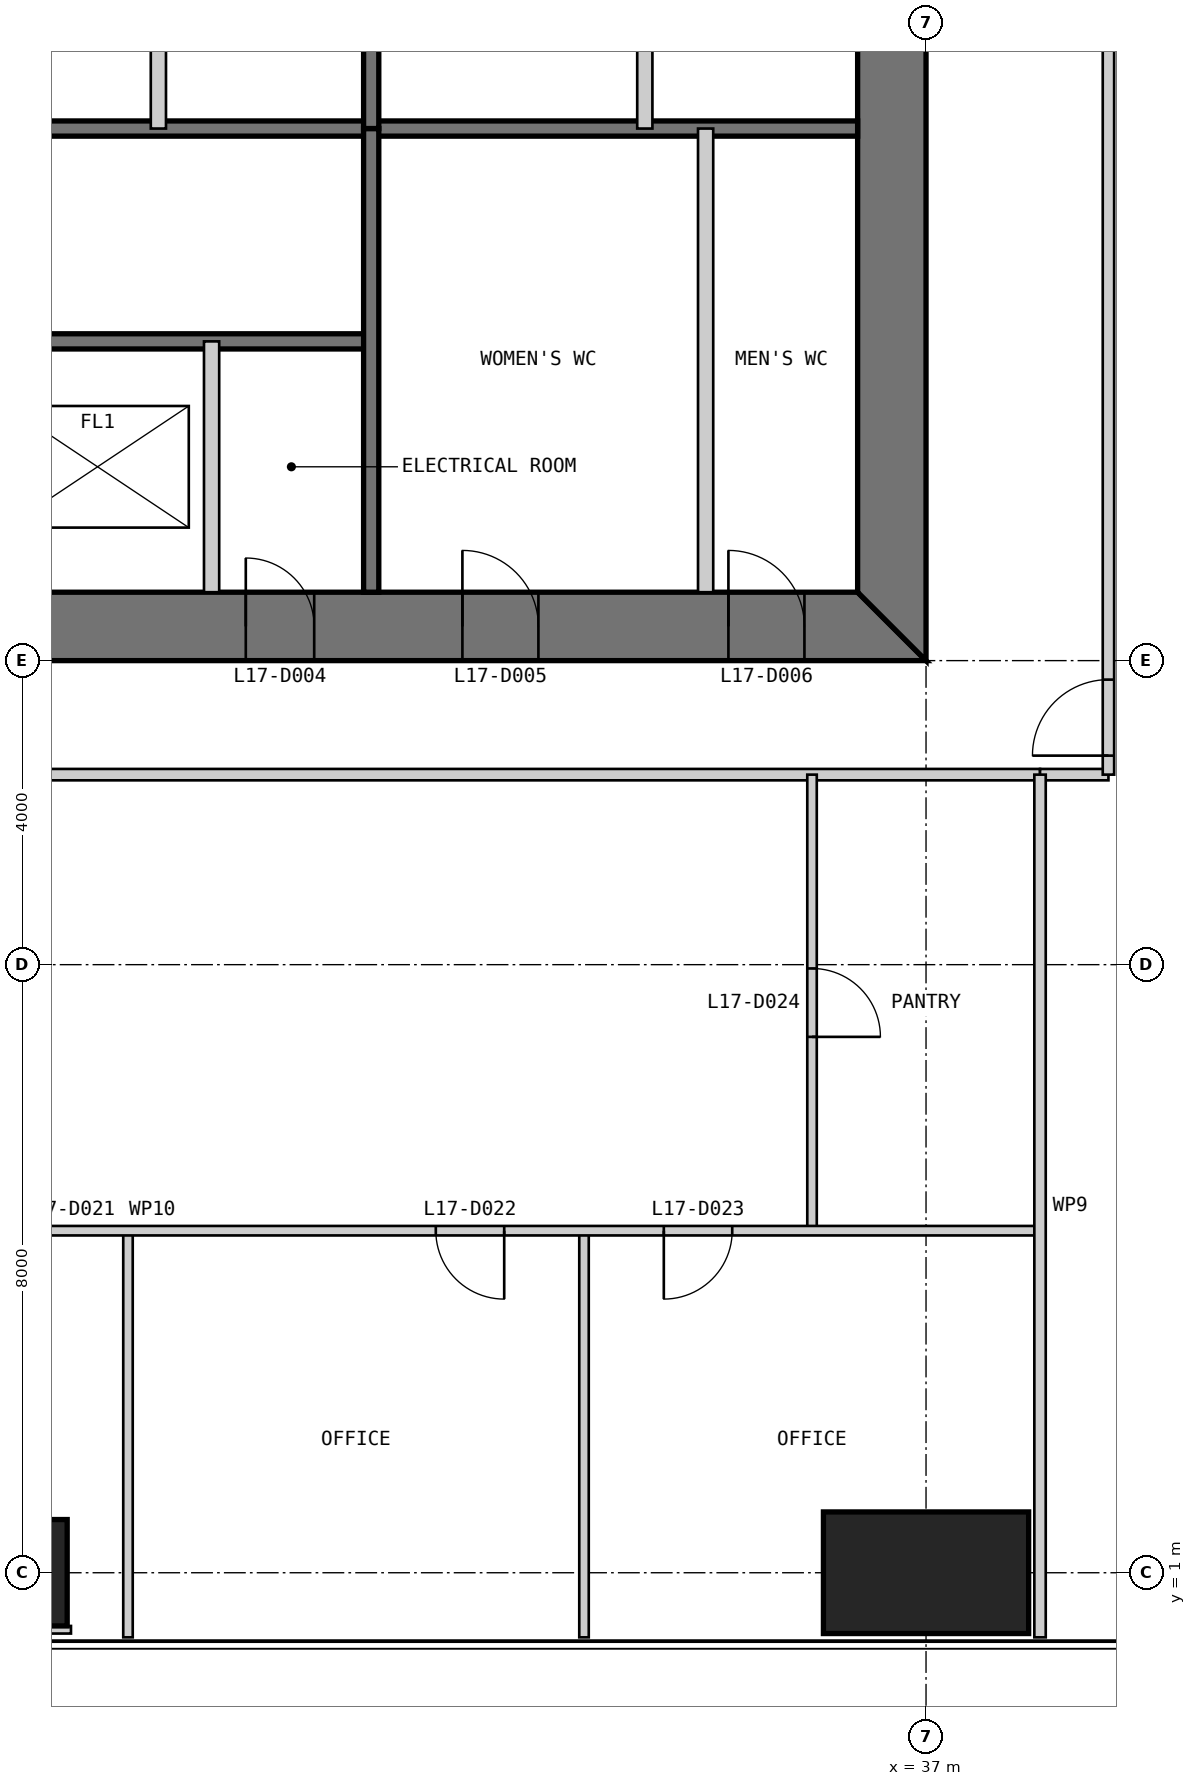
"""IFC4 building model, lengths in metres.
Left out: names, types, materials, properties, quantities, classifications, styles, units other than length and angle.
Written with IfcOpenShell. Run it as: python <this file> out.ifc"""

import sys

from ifc_helpers import new_model, si_unit, direction, frame, frame_2d, origin, origin_2d, place, context, subcontext, project, spatial, polyline, rectangle, outline, extrude, element, fill, save


model = new_model("IFC4")
c1 = context("Model", 3, precision=1e-05, world=origin(), true_north=direction((0.0, 1.0)))
c2 = subcontext(c1, "Body", "Model", "MODEL_VIEW")
j1 = project(units=[si_unit("LENGTHUNIT", "METRE"), si_unit("PLANEANGLEUNIT", "RADIAN")], contexts=[c1])
p1 = place(None, origin())
s1 = spatial("IfcSite", under=j1, at=p1, CompositionType="ELEMENT")
p2 = place(p1, origin())
s2 = spatial("IfcBuilding", under=s1, at=p2, CompositionType="ELEMENT")
p3 = place(p2, frame((0.0, 0.0, 75.0)))
s3 = spatial("IfcBuildingStorey", under=s2, at=p3, CompositionType="ELEMENT", Elevation=75.0)
p4 = place(p3, frame((25.0, 1.0, 0.0), z_axis=(0.0, 0.0, 1.0), x_axis=(1.0, 0.0, 0.0)))
e1 = element("IfcColumn", 1, at=p4, inside=s3, PredefinedType="COLUMN", context=c2, shape_type="SweptSolid", body=[
    extrude(rectangle(XDim=1.4, YDim=1.4, at=origin_2d()), origin(), (0.0, 0.0, 1.0), 4.0),
])
p5 = place(p3, frame((37.0, 1.0, 0.0), z_axis=(0.0, 0.0, 1.0), x_axis=(1.0, 0.0, 0.0)))
e2 = element("IfcColumn", 2, at=p5, inside=s3, PredefinedType="COLUMN", context=c2, shape_type="SweptSolid", body=[
    extrude(rectangle(XDim=2.7, YDim=1.6, at=origin_2d()), origin(), (0.0, 0.0, 1.0), 4.0),
])
p6 = place(p3, frame((13.0, 13.45, 0.0), z_axis=(0.0, 0.0, 1.0), x_axis=(1.0, 0.0, 0.0)))
e3 = element("IfcWall", 3, at=p6, inside=s3, PredefinedType="SHEAR", context=c2, shape_type="SweptSolid", body=[
    extrude(outline(polyline([(0.0, -0.45), (24.0, -0.45), (23.1, 0.45), (0.9, 0.45), (0.0, -0.45)])), origin(), (0.0, 0.0, 1.0), 4.0),
])
p7 = place(p6, frame((4.9, 0.0, 0.0)))
e4 = element("IfcOpeningElement", 4, at=p7, cuts=e3, PredefinedType="OPENING", context=c2, shape_type="SweptSolid", body=[
    extrude(rectangle(XDim=1.0, YDim=2.2, at=frame_2d((0.5, 1.1))), frame((0.0, 0.46, 0.0), z_axis=(0.0, -1.0, 0.0), x_axis=(1.0, 0.0, 0.0)), (0.0, 0.0, 1.0), 0.92),
])
p8 = place(p6, frame((8.9, 0.0, 0.0)))
e5 = element("IfcOpeningElement", 5, at=p8, cuts=e3, PredefinedType="OPENING", context=c2, shape_type="SweptSolid", body=[
    extrude(rectangle(XDim=1.1, YDim=2.2, at=frame_2d((0.55, 1.1))), frame((0.0, 0.46, 0.0), z_axis=(0.0, -1.0, 0.0), x_axis=(1.0, 0.0, 0.0)), (0.0, 0.0, 1.0), 0.92),
])
p9 = place(p6, frame((15.05, 0.0, 0.0)))
e6 = element("IfcOpeningElement", 6, at=p9, cuts=e3, PredefinedType="OPENING", context=c2, shape_type="SweptSolid", body=[
    extrude(rectangle(XDim=0.9, YDim=2.2, at=frame_2d((0.45, 1.1))), frame((0.0, 0.46, 0.0), z_axis=(0.0, -1.0, 0.0), x_axis=(1.0, 0.0, 0.0)), (0.0, 0.0, 1.0), 0.92),
])
p10 = place(p6, frame((17.9, 0.0, 0.0)))
e7 = element("IfcOpeningElement", 7, at=p10, cuts=e3, PredefinedType="OPENING", context=c2, shape_type="SweptSolid", body=[
    extrude(rectangle(XDim=1.0, YDim=2.2, at=frame_2d((0.5, 1.1))), frame((0.0, 0.46, 0.0), z_axis=(0.0, -1.0, 0.0), x_axis=(1.0, 0.0, 0.0)), (0.0, 0.0, 1.0), 0.92),
])
p11 = place(p6, frame((21.4, 0.0, 0.0)))
e8 = element("IfcOpeningElement", 8, at=p11, cuts=e3, PredefinedType="OPENING", context=c2, shape_type="SweptSolid", body=[
    extrude(rectangle(XDim=1.0, YDim=2.2, at=frame_2d((0.5, 1.1))), frame((0.0, 0.46, 0.0), z_axis=(0.0, -1.0, 0.0), x_axis=(1.0, 0.0, 0.0)), (0.0, 0.0, 1.0), 0.92),
])
p12 = place(p3, frame((36.55, 13.9, 0.0), z_axis=(0.0, 0.0, 1.0), x_axis=(0.0, 1.0, 0.0)))
e9 = element("IfcWall", 9, at=p12, inside=s3, PredefinedType="SHEAR", context=c2, shape_type="SweptSolid", body=[
    extrude(outline(polyline([(-0.9, -0.45), (23.1, -0.45), (22.2, 0.45), (0.0, 0.45), (-0.9, -0.45)])), origin(), (0.0, 0.0, 1.0), 4.0),
])
p13 = place(p12, frame((20.2, 0.0, 0.0)))
e10 = element("IfcOpeningElement", 10, at=p13, cuts=e9, PredefinedType="OPENING", context=c2, shape_type="SweptSolid", body=[
    extrude(rectangle(XDim=1.0, YDim=2.2, at=frame_2d((0.5, 1.1))), frame((0.0, 0.46, 0.0), z_axis=(0.0, -1.0, 0.0), x_axis=(1.0, 0.0, 0.0)), (0.0, 0.0, 1.0), 0.92),
])
p14 = place(p12, frame((17.25, 0.0, 0.0)))
e11 = element("IfcOpeningElement", 11, at=p14, cuts=e9, PredefinedType="OPENING", context=c2, shape_type="SweptSolid", body=[
    extrude(rectangle(XDim=0.9, YDim=2.2, at=frame_2d((0.45, 1.1))), frame((0.0, 0.46, 0.0), z_axis=(0.0, -1.0, 0.0), x_axis=(1.0, 0.0, 0.0)), (0.0, 0.0, 1.0), 0.92),
])
p15 = place(p3, frame((20.3, 17.2, 0.0), z_axis=(0.0, 0.0, 1.0), x_axis=(1.0, 0.0, 0.0)))
e12 = element("IfcWall", 12, at=p15, inside=s3, PredefinedType="SOLIDWALL", context=c2, shape_type="SweptSolid", body=[
    extrude(rectangle(XDim=9.4, YDim=0.2, at=frame_2d((4.7, 0.0))), origin(), (0.0, 0.0, 1.0), 3.8),
])
p16 = place(p15, frame((0.25, 0.0, 0.0)))
e13 = element("IfcOpeningElement", 13, at=p16, cuts=e12, PredefinedType="OPENING", context=c2, shape_type="SweptSolid", body=[
    extrude(rectangle(XDim=1.0, YDim=2.2, at=frame_2d((0.5, 1.1))), frame((0.0, 0.11, 0.0), z_axis=(0.0, -1.0, 0.0), x_axis=(1.0, 0.0, 0.0)), (0.0, 0.0, 1.0), 0.22),
])
p17 = place(p3, frame((20.3, 20.0, 0.0), z_axis=(0.0, 0.0, 1.0), x_axis=(1.0, 0.0, 0.0)))
e14 = element("IfcWall", 14, at=p17, inside=s3, PredefinedType="SOLIDWALL", context=c2, shape_type="SweptSolid", body=[
    extrude(rectangle(XDim=15.8, YDim=0.2, at=frame_2d((7.9, 0.0))), origin(), (0.0, 0.0, 1.0), 3.8),
])
p18 = place(p3, frame((27.6, 13.9, 0.0), z_axis=(0.0, 0.0, 1.0), x_axis=(0.0, 1.0, 0.0)))
e15 = element("IfcWall", 15, at=p18, inside=s3, PredefinedType="PARTITIONING", context=c2, shape_type="SweptSolid", body=[
    extrude(rectangle(XDim=3.3, YDim=0.2, at=frame_2d((1.65, 0.0))), origin(), (0.0, 0.0, 1.0), 3.8),
])
p19 = place(p3, frame((29.7, 13.9, 0.0), z_axis=(0.0, 0.0, 1.0), x_axis=(0.0, 1.0, 0.0)))
e16 = element("IfcWall", 16, at=p19, inside=s3, PredefinedType="SOLIDWALL", context=c2, shape_type="SweptSolid", body=[
    extrude(rectangle(XDim=6.1, YDim=0.2, at=frame_2d((3.05, 0.0))), origin(), (0.0, 0.0, 1.0), 3.8),
])
p20 = place(p3, frame((34.1, 13.9, 0.0), z_axis=(0.0, 0.0, 1.0), x_axis=(0.0, 1.0, 0.0)))
e17 = element("IfcWall", 17, at=p20, inside=s3, PredefinedType="PARTITIONING", context=c2, shape_type="SweptSolid", body=[
    extrude(rectangle(XDim=6.1, YDim=0.2, at=frame_2d((3.05, 0.0))), origin(), (0.0, 0.0, 1.0), 3.8),
])
p21 = place(p3, frame((33.3, 36.1, 0.0), z_axis=(0.0, 0.0, 1.0), x_axis=(0.0, -1.0, 0.0)))
e18 = element("IfcWall", 18, at=p21, inside=s3, PredefinedType="PARTITIONING", context=c2, shape_type="SweptSolid", body=[
    extrude(rectangle(XDim=16.1, YDim=0.2, at=frame_2d((8.05, 0.0))), origin(), (0.0, 0.0, 1.0), 3.8),
])
p22 = place(p21, frame((4.4, 0.0, 0.0)))
e19 = element("IfcOpeningElement", 19, at=p22, cuts=e18, PredefinedType="OPENING", context=c2, shape_type="SweptSolid", body=[
    extrude(rectangle(XDim=0.9, YDim=2.2, at=frame_2d((0.45, 1.1))), frame((0.0, 0.11, 0.0), z_axis=(0.0, -1.0, 0.0), x_axis=(1.0, 0.0, 0.0)), (0.0, 0.0, 1.0), 0.22),
])
p23 = place(p3, frame((29.7, 36.1, 0.0), z_axis=(0.0, 0.0, 1.0), x_axis=(0.0, -1.0, 0.0)))
e20 = element("IfcWall", 20, at=p23, inside=s3, PredefinedType="SOLIDWALL", context=c2, shape_type="SweptSolid", body=[
    extrude(rectangle(XDim=16.1, YDim=0.2, at=frame_2d((8.05, 0.0))), origin(), (0.0, 0.0, 1.0), 3.8),
])
p24 = place(p3, frame((26.9, 30.0, 0.0), z_axis=(0.0, 0.0, 1.0), x_axis=(0.0, -1.0, 0.0)))
e21 = element("IfcWall", 21, at=p24, inside=s3, PredefinedType="PARTITIONING", context=c2, shape_type="SweptSolid", body=[
    extrude(rectangle(XDim=10.0, YDim=0.2, at=frame_2d((5.0, 0.0))), origin(), (0.0, 0.0, 1.0), 3.8),
])
p25 = place(p3, frame((11.5, 11.5, 0.0), z_axis=(0.0, 0.0, 1.0), x_axis=(1.0, 0.0, 0.0)))
e22 = element("IfcWall", 22, at=p25, inside=s3, PredefinedType="PARTITIONING", context=c2, shape_type="SweptSolid", body=[
    extrude(rectangle(XDim=27.0, YDim=0.15, at=frame_2d((13.5, 0.0))), origin(), (0.0, 0.0, 1.0), 3.85),
])
p26 = place(p25, frame((11.5, 0.0, 0.0)))
e23 = element("IfcOpeningElement", 23, at=p26, cuts=e22, PredefinedType="OPENING", context=c2, shape_type="SweptSolid", body=[
    extrude(rectangle(XDim=1.0, YDim=2.2, at=frame_2d((0.5, 1.1))), frame((0.0, 0.085, 0.0), z_axis=(0.0, -1.0, 0.0), x_axis=(1.0, 0.0, 0.0)), (0.0, 0.0, 1.0), 0.17),
])
for number, where, z_axis, x_axis in (
    (24, (26.5, 0.15, 0.0), (0.0, 0.0, 1.0), (0.0, 1.0, 0.0)),
    (25, (32.5, 0.15, 0.0), (0.0, 0.0, 1.0), (0.0, 1.0, 0.0)),
):
    element("IfcWall", number, at=place(p3, frame(where, z_axis=z_axis, x_axis=x_axis)), inside=s3, PredefinedType="PARTITIONING", context=c2, shape_type="SweptSolid", body=[
        extrude(rectangle(XDim=5.35, YDim=0.125, at=frame_2d((2.675, 0.0))), origin(), (0.0, 0.0, 1.0), 3.85),
    ])
p27 = place(p3, frame((35.5, 5.5, 0.0), z_axis=(0.0, 0.0, 1.0), x_axis=(0.0, 1.0, 0.0)))
e26 = element("IfcWall", 26, at=p27, inside=s3, PredefinedType="PARTITIONING", context=c2, shape_type="SweptSolid", body=[
    extrude(rectangle(XDim=6.0, YDim=0.125, at=frame_2d((3.0, 0.0))), origin(), (0.0, 0.0, 1.0), 3.85),
])
p28 = place(p27, frame((2.55, 0.0, 0.0)))
e27 = element("IfcOpeningElement", 27, at=p28, cuts=e26, PredefinedType="OPENING", context=c2, shape_type="SweptSolid", body=[
    extrude(rectangle(XDim=0.9, YDim=2.2, at=frame_2d((0.45, 1.1))), frame((0.0, 0.073, 0.0), z_axis=(0.0, -1.0, 0.0), x_axis=(1.0, 0.0, 0.0)), (0.0, 0.0, 1.0), 0.145),
])
p29 = place(p3, frame((14.5, 5.5, 0.0), z_axis=(0.0, 0.0, 1.0), x_axis=(1.0, 0.0, 0.0)))
e28 = element("IfcWall", 28, at=p29, inside=s3, PredefinedType="PARTITIONING", context=c2, shape_type="SweptSolid", body=[
    extrude(rectangle(XDim=24.0, YDim=0.125, at=frame_2d((12.0, 0.0))), origin(), (0.0, 0.0, 1.0), 3.85),
])
p30 = place(p29, frame((10.05, 0.0, 0.0)))
e29 = element("IfcOpeningElement", 29, at=p30, cuts=e28, PredefinedType="OPENING", context=c2, shape_type="SweptSolid", body=[
    extrude(rectangle(XDim=0.9, YDim=2.2, at=frame_2d((0.45, 1.1))), frame((0.0, 0.073, 0.0), z_axis=(0.0, -1.0, 0.0), x_axis=(1.0, 0.0, 0.0)), (0.0, 0.0, 1.0), 0.145),
])
p31 = place(p29, frame((16.05, 0.0, 0.0)))
e30 = element("IfcOpeningElement", 30, at=p31, cuts=e28, PredefinedType="OPENING", context=c2, shape_type="SweptSolid", body=[
    extrude(rectangle(XDim=0.9, YDim=2.2, at=frame_2d((0.45, 1.1))), frame((0.0, 0.073, 0.0), z_axis=(0.0, -1.0, 0.0), x_axis=(1.0, 0.0, 0.0)), (0.0, 0.0, 1.0), 0.145),
])
p32 = place(p29, frame((19.05, 0.0, 0.0)))
e31 = element("IfcOpeningElement", 31, at=p32, cuts=e28, PredefinedType="OPENING", context=c2, shape_type="SweptSolid", body=[
    extrude(rectangle(XDim=0.9, YDim=2.2, at=frame_2d((0.45, 1.1))), frame((0.0, 0.073, 0.0), z_axis=(0.0, -1.0, 0.0), x_axis=(1.0, 0.0, 0.0)), (0.0, 0.0, 1.0), 0.145),
])
p33 = place(p3, frame((38.5, 11.5, 0.0), z_axis=(0.0, 0.0, 1.0), x_axis=(1.0, 0.0, 0.0)))
e32 = element("IfcWall", 32, at=p33, inside=s3, PredefinedType="PARTITIONING", context=c2, shape_type="SweptSolid", body=[
    extrude(rectangle(XDim=0.9, YDim=0.15, at=frame_2d((0.45, 0.0))), origin(), (0.0, 0.0, 1.0), 3.85),
])
p34 = place(p3, frame((39.4, 11.5, 0.0), z_axis=(0.0, 0.0, 1.0), x_axis=(0.0, 1.0, 0.0)))
e33 = element("IfcWall", 33, at=p34, inside=s3, PredefinedType="PARTITIONING", context=c2, shape_type="SweptSolid", body=[
    extrude(rectangle(XDim=27.9, YDim=0.15, at=frame_2d((13.95, 0.0))), origin(), (0.0, 0.0, 1.0), 3.85),
])
p35 = place(p34, frame((0.25, 0.0, 0.0)))
e34 = element("IfcOpeningElement", 34, at=p35, cuts=e33, PredefinedType="OPENING", context=c2, shape_type="SweptSolid", body=[
    extrude(rectangle(XDim=1.0, YDim=2.2, at=frame_2d((0.5, 1.1))), frame((0.0, 0.085, 0.0), z_axis=(0.0, -1.0, 0.0), x_axis=(1.0, 0.0, 0.0)), (0.0, 0.0, 1.0), 0.17),
])
p36 = place(p34, frame((22.75, 0.0, 0.0)))
e35 = element("IfcOpeningElement", 35, at=p36, cuts=e33, PredefinedType="OPENING", context=c2, shape_type="SweptSolid", body=[
    extrude(rectangle(XDim=1.0, YDim=2.2, at=frame_2d((0.5, 1.1))), frame((0.0, 0.085, 0.0), z_axis=(0.0, -1.0, 0.0), x_axis=(1.0, 0.0, 0.0)), (0.0, 0.0, 1.0), 0.17),
])
p37 = place(p3, frame((38.5, 0.15, 0.0), z_axis=(0.0, 0.0, 1.0), x_axis=(0.0, 1.0, 0.0)))
e36 = element("IfcWall", 36, at=p37, inside=s3, PredefinedType="PARTITIONING", context=c2, shape_type="SweptSolid", body=[
    extrude(rectangle(XDim=11.35, YDim=0.15, at=frame_2d((5.675, 0.0))), origin(), (0.0, 0.0, 1.0), 3.85),
])
p38 = place(p3, frame((25.0, 0.2, 0.0), z_axis=(0.0, 0.0, 1.0), x_axis=(0.0, 1.0, 0.0)))
e37 = element("IfcWall", 37, at=p38, inside=s3, PredefinedType="PARTITIONING", context=c2, shape_type="SweptSolid", body=[
    extrude(rectangle(XDim=0.1, YDim=1.5, at=frame_2d((0.05, 0.0))), origin(), (0.0, 0.0, 1.0), 3.85),
])
p39 = place(p9, origin())
e38 = element("IfcDoor", 38, at=p39, inside=s3, OperationType="SINGLE_SWING_LEFT", PredefinedType="DOOR", context=c2, shape_type="SweptSolid", body=[
    extrude(rectangle(XDim=0.9, YDim=2.2, at=frame_2d((0.45, 1.1))), frame((0.0, 0.025, 0.0), z_axis=(0.0, -1.0, 0.0), x_axis=(1.0, 0.0, 0.0)), (0.0, 0.0, 1.0), 0.05),
    extrude(outline(polyline([(0.0, 0.0), (0.04, 0.0), (0.04, 2.16), (0.86, 2.16), (0.86, 0.0), (0.9, 0.0), (0.9, 2.2), (0.0, 2.2), (0.0, 0.0)])), frame((0.0, 0.3, 0.0), z_axis=(0.0, -1.0, 0.0), x_axis=(1.0, 0.0, 0.0)), (0.0, 0.0, 1.0), 0.6),
])
fill(e6, e38)
p40 = place(p10, origin())
e39 = element("IfcDoor", 39, at=p40, inside=s3, OperationType="SINGLE_SWING_LEFT", PredefinedType="DOOR", context=c2, shape_type="SweptSolid", body=[
    extrude(rectangle(XDim=1.0, YDim=2.2, at=frame_2d((0.5, 1.1))), frame((0.0, 0.025, 0.0), z_axis=(0.0, -1.0, 0.0), x_axis=(1.0, 0.0, 0.0)), (0.0, 0.0, 1.0), 0.05),
    extrude(outline(polyline([(0.0, 0.0), (0.04, 0.0), (0.04, 2.16), (0.96, 2.16), (0.96, 0.0), (1.0, 0.0), (1.0, 2.2), (0.0, 2.2), (0.0, 0.0)])), frame((0.0, 0.3, 0.0), z_axis=(0.0, -1.0, 0.0), x_axis=(1.0, 0.0, 0.0)), (0.0, 0.0, 1.0), 0.6),
])
fill(e7, e39)
p41 = place(p11, origin())
e40 = element("IfcDoor", 40, at=p41, inside=s3, OperationType="SINGLE_SWING_LEFT", PredefinedType="DOOR", context=c2, shape_type="SweptSolid", body=[
    extrude(rectangle(XDim=1.0, YDim=2.2, at=frame_2d((0.5, 1.1))), frame((0.0, 0.025, 0.0), z_axis=(0.0, -1.0, 0.0), x_axis=(1.0, 0.0, 0.0)), (0.0, 0.0, 1.0), 0.05),
    extrude(outline(polyline([(0.0, 0.0), (0.04, 0.0), (0.04, 2.16), (0.96, 2.16), (0.96, 0.0), (1.0, 0.0), (1.0, 2.2), (0.0, 2.2), (0.0, 0.0)])), frame((0.0, 0.3, 0.0), z_axis=(0.0, -1.0, 0.0), x_axis=(1.0, 0.0, 0.0)), (0.0, 0.0, 1.0), 0.6),
])
fill(e8, e40)
p42 = place(p31, frame((0.9, 0.0, 0.0), z_axis=(0.0, 0.0, 1.0), x_axis=(-1.0, 0.0, 0.0)))
e41 = element("IfcDoor", 41, at=p42, inside=s3, OperationType="SINGLE_SWING_LEFT", PredefinedType="DOOR", context=c2, shape_type="SweptSolid", body=[
    extrude(rectangle(XDim=0.9, YDim=2.2, at=frame_2d((0.45, 1.1))), frame((0.0, 0.025, 0.0), z_axis=(0.0, -1.0, 0.0), x_axis=(1.0, 0.0, 0.0)), (0.0, 0.0, 1.0), 0.05),
])
fill(e30, e41)
p43 = place(p32, frame((0.9, 0.0, 0.0), z_axis=(0.0, 0.0, 1.0), x_axis=(-1.0, 0.0, 0.0)))
e42 = element("IfcDoor", 42, at=p43, inside=s3, OperationType="SINGLE_SWING_RIGHT", PredefinedType="DOOR", context=c2, shape_type="SweptSolid", body=[
    extrude(rectangle(XDim=0.9, YDim=2.2, at=frame_2d((0.45, 1.1))), frame((0.0, 0.025, 0.0), z_axis=(0.0, -1.0, 0.0), x_axis=(1.0, 0.0, 0.0)), (0.0, 0.0, 1.0), 0.05),
])
fill(e31, e42)
p44 = place(p28, frame((0.9, 0.0, 0.0), z_axis=(0.0, 0.0, 1.0), x_axis=(-1.0, 0.0, 0.0)))
e43 = element("IfcDoor", 43, at=p44, inside=s3, OperationType="SINGLE_SWING_RIGHT", PredefinedType="DOOR", context=c2, shape_type="SweptSolid", body=[
    extrude(rectangle(XDim=0.9, YDim=2.2, at=frame_2d((0.45, 1.1))), frame((0.0, 0.025, 0.0), z_axis=(0.0, -1.0, 0.0), x_axis=(1.0, 0.0, 0.0)), (0.0, 0.0, 1.0), 0.05),
])
fill(e27, e43)
p45 = place(p35, origin())
e44 = element("IfcDoor", 44, at=p45, inside=s3, OperationType="SINGLE_SWING_LEFT", PredefinedType="DOOR", context=c2, shape_type="SweptSolid", body=[
    extrude(rectangle(XDim=1.0, YDim=2.2, at=frame_2d((0.5, 1.1))), frame((0.0, 0.025, 0.0), z_axis=(0.0, -1.0, 0.0), x_axis=(1.0, 0.0, 0.0)), (0.0, 0.0, 1.0), 0.05),
])
fill(e34, e44)
save(model, sys.argv[1])
